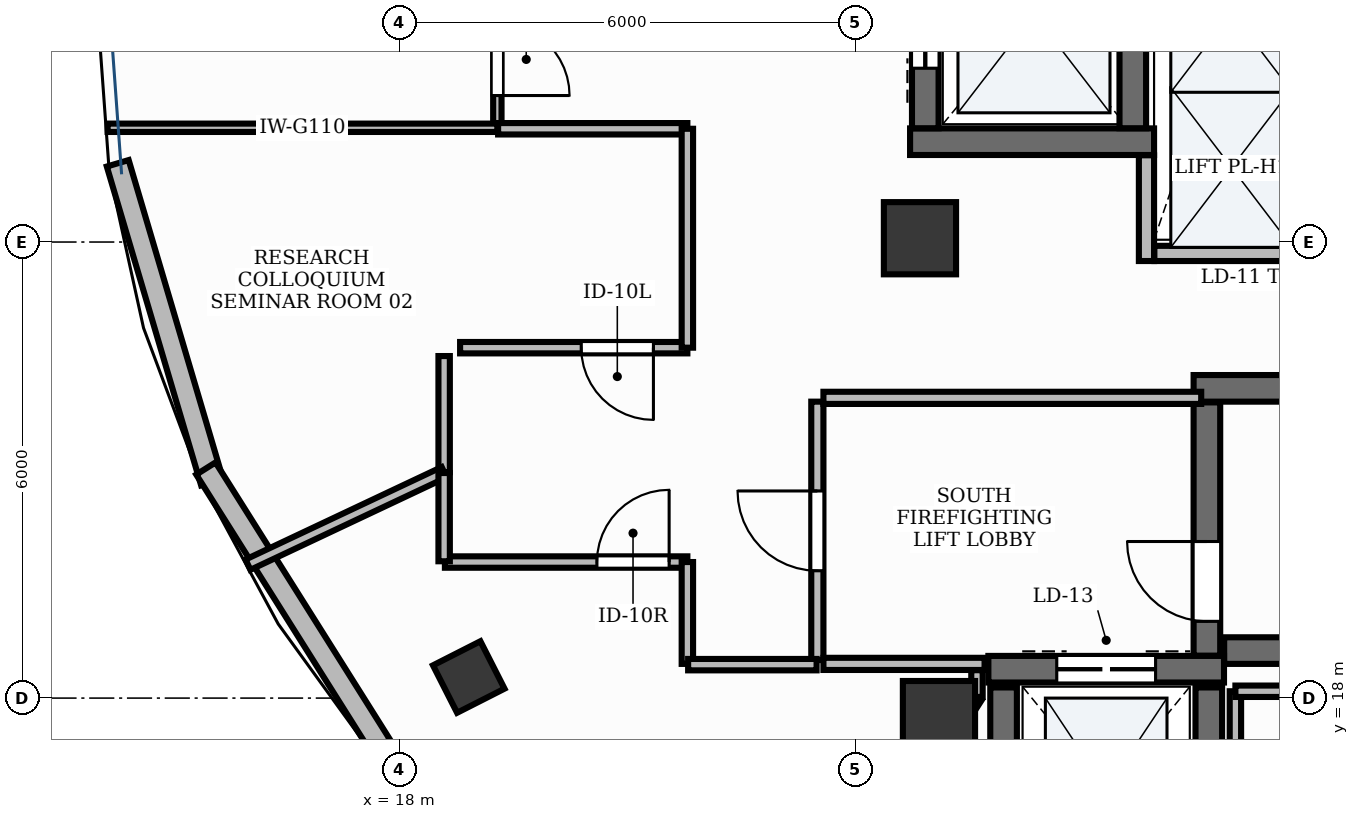
"""IFC4 building model, lengths in metres.
Left out: names, types, materials, properties, quantities, classifications, styles, units other than length and angle.
Written with IfcOpenShell. Run it as: python <this file> out.ifc"""

import sys

from ifc_helpers import new_model, si_unit, direction, frame, frame_2d, origin, origin_2d, place, context, subcontext, project, spatial, rectangle, extrude, element, fill, save


model = new_model("IFC4")
c1 = context("Model", 3, precision=1e-05, world=origin(), true_north=direction((0.0, 1.0)))
c2 = subcontext(c1, "Body", "Model", "MODEL_VIEW")
j1 = project(units=[si_unit("LENGTHUNIT", "METRE"), si_unit("PLANEANGLEUNIT", "RADIAN")], contexts=[c1])
p1 = place(None, origin())
s1 = spatial("IfcSite", under=j1, at=p1, CompositionType="ELEMENT")
p2 = place(p1, origin())
s2 = spatial("IfcBuilding", under=s1, at=p2, CompositionType="ELEMENT")
p3 = place(p2, frame((0.0, 0.0, 327.0)))
s3 = spatial("IfcBuildingStorey", under=s2, at=p3, CompositionType="ELEMENT", Elevation=327.0)
p4 = place(p3, frame((28.852, 18.625, 0.0), z_axis=(0.0, 0.0, 1.0), x_axis=(1.0, 0.0, 0.0)))
e1 = element("IfcWall", 1, at=p4, inside=s3, PredefinedType="SHEAR", context=c2, shape_type="SweptSolid", body=[
    extrude(rectangle(XDim=8.148, YDim=0.35, at=frame_2d((4.074, 0.0))), origin(), (0.0, 0.0, 1.0), 3.9),
])
p5 = place(p3, frame((28.45, 22.075, 0.0), z_axis=(0.0, 0.0, 1.0), x_axis=(1.0, 0.0, 0.0)))
e2 = element("IfcWall", 2, at=p5, inside=s3, PredefinedType="SHEAR", context=c2, shape_type="SweptSolid", body=[
    extrude(rectangle(XDim=8.55, YDim=0.35, at=frame_2d((4.275, 0.0))), origin(), (0.0, 0.0, 1.0), 3.9),
])
p6 = place(p3, frame((28.625, 18.557, 0.0), z_axis=(0.0, 0.0, 1.0), x_axis=(0.0, 1.0, 0.0)))
e3 = element("IfcWall", 3, at=p6, inside=s3, PredefinedType="SHEAR", context=c2, shape_type="SweptSolid", body=[
    extrude(rectangle(XDim=3.333, YDim=0.35, at=frame_2d((1.667, 0.0))), origin(), (0.0, 0.0, 1.0), 3.9),
])
p7 = place(p6, frame((0.453, 0.0, 0.0)))
e4 = element("IfcOpeningElement", 4, at=p7, cuts=e3, PredefinedType="OPENING", context=c2, shape_type="SweptSolid", body=[
    extrude(rectangle(XDim=1.05, YDim=2.15, at=frame_2d((0.525, 1.075))), frame((0.0, 0.19, 0.0), z_axis=(0.0, -1.0, 0.0), x_axis=(1.0, 0.0, 0.0)), (0.0, 0.0, 1.0), 0.38),
])
p8 = place(p3, frame((25.75, 18.38, 0.0), z_axis=(0.0, 0.0, 1.0), x_axis=(1.0, 0.0, 0.0)))
e5 = element("IfcWall", 5, at=p8, inside=s3, PredefinedType="SHEAR", context=c2, shape_type="SweptSolid", body=[
    extrude(rectangle(XDim=3.1, YDim=0.35, at=frame_2d((1.55, 0.0))), origin(), (0.0, 0.0, 1.0), 3.9),
])
p9 = place(p8, frame((0.9, 0.0, 0.0)))
e6 = element("IfcOpeningElement", 6, at=p9, cuts=e5, PredefinedType="OPENING", context=c2, shape_type="SweptSolid", body=[
    extrude(rectangle(XDim=1.3, YDim=2.2, at=frame_2d((0.65, 1.1))), frame((0.0, 0.19, 0.0), z_axis=(0.0, -1.0, 0.0), x_axis=(1.0, 0.0, 0.0)), (0.0, 0.0, 1.0), 0.38),
])
for number, where, z_axis, x_axis in (
    (7, (25.95, 15.44, 0.0), (0.0, 0.0, 1.0), (0.0, 1.0, 0.0)),
    (8, (28.65, 15.44, 0.0), (0.0, 0.0, 1.0), (0.0, 1.0, 0.0)),
):
    element("IfcWall", number, at=place(p3, frame(where, z_axis=z_axis, x_axis=x_axis)), inside=s3, PredefinedType="SHEAR", context=c2, shape_type="SweptSolid", body=[
        extrude(rectangle(XDim=2.7, YDim=0.35, at=frame_2d((1.35, 0.0))), origin(), (0.0, 0.0, 1.0), 3.9),
    ])
p10 = place(p3, frame((24.72, 25.32, 0.0), z_axis=(0.0, 0.0, 1.0), x_axis=(1.0, 0.0, 0.0)))
e9 = element("IfcWall", 9, at=p10, inside=s3, PredefinedType="SHEAR", context=c2, shape_type="SweptSolid", body=[
    extrude(rectangle(XDim=3.21, YDim=0.35, at=frame_2d((1.605, 0.0))), origin(), (0.0, 0.0, 1.0), 3.9),
])
p11 = place(p3, frame((24.92, 25.497, 0.0), z_axis=(0.0, 0.0, 1.0), x_axis=(0.0, 1.0, 0.0)))
e10 = element("IfcWall", 10, at=p11, inside=s3, PredefinedType="SHEAR", context=c2, shape_type="SweptSolid", body=[
    extrude(rectangle(XDim=3.006, YDim=0.35, at=frame_2d((1.503, 0.0))), origin(), (0.0, 0.0, 1.0), 3.9),
])
p12 = place(p11, frame((0.79, 0.0, 0.0)))
e11 = element("IfcOpeningElement", 11, at=p12, cuts=e10, PredefinedType="OPENING", context=c2, shape_type="SweptSolid", body=[
    extrude(rectangle(XDim=1.3, YDim=2.2, at=frame_2d((0.65, 1.1))), frame((0.0, 0.19, 0.0), z_axis=(0.0, -1.0, 0.0), x_axis=(1.0, 0.0, 0.0)), (0.0, 0.0, 1.0), 0.38),
])
p13 = place(p3, frame((27.65, 25.497, 0.0), z_axis=(0.0, 0.0, 1.0), x_axis=(0.0, 1.0, 0.0)))
e12 = element("IfcWall", 12, at=p13, inside=s3, PredefinedType="SHEAR", context=c2, shape_type="SweptSolid", body=[
    extrude(rectangle(XDim=3.006, YDim=0.35, at=frame_2d((1.503, 0.0))), origin(), (0.0, 0.0, 1.0), 3.9),
])
for number, where, z_axis, x_axis in (
    (13, (24.85, 24.05, -0.0), (0.0, 0.0, 1.0), (1.0, 0.0, 0.0)),
    (14, (25.1, 17.75, -0.0), (0.0, 0.0, 1.0), (1.0, 0.0, 0.0)),
):
    element("IfcColumn", number, at=place(p3, frame(where, z_axis=z_axis, x_axis=x_axis)), inside=s3, PredefinedType="PILASTER", context=c2, shape_type="SweptSolid", body=[
        extrude(rectangle(XDim=0.95, YDim=0.95, at=origin_2d()), origin(), (0.0, 0.0, 1.0), 3.901),
    ])
p14 = place(p3, frame((18.914, 18.277, -0.0), z_axis=(0.0, 0.0, 1.0), x_axis=(-0.453057191132, 0.891481453292, 0.0)))
e15 = element("IfcColumn", 15, at=p14, inside=s3, PredefinedType="COLUMN", context=c2, shape_type="SweptSolid", body=[
    extrude(rectangle(XDim=0.7, YDim=0.7, at=origin_2d()), origin(), (0.0, 0.0, 1.0), 3.901),
])
p15 = place(p3, frame((14.296, 25.036, 0.0), z_axis=(0.0, 0.0, 1.0), x_axis=(0.28362844186, -0.958934255811, 0.0)))
e16 = element("IfcWall", 16, at=p15, inside=s3, PredefinedType="STANDARD", context=c2, shape_type="SweptSolid", body=[
    extrude(rectangle(XDim=4.375, YDim=0.3, at=frame_2d((2.187, 0.0))), origin(), (0.0, 0.0, 1.0), 3.9),
])
p16 = place(p3, frame((15.456, 21.021, 0.0), z_axis=(0.0, 0.0, 1.0), x_axis=(0.532667112983, -0.846324847057, 0.0)))
e17 = element("IfcWall", 17, at=p16, inside=s3, PredefinedType="STANDARD", context=c2, shape_type="SweptSolid", body=[
    extrude(rectangle(XDim=4.519, YDim=0.3, at=frame_2d((2.26, 0.0))), origin(), (0.0, 0.0, 1.0), 3.9),
])
p17 = place(p3, frame((27.83, 23.75, 0.0), z_axis=(0.0, 0.0, 1.0), x_axis=(0.0, 1.0, 0.0)))
e18 = element("IfcWall", 18, at=p17, inside=s3, PredefinedType="PARTITIONING", context=c2, shape_type="SweptSolid", body=[
    extrude(rectangle(XDim=1.391, YDim=0.2, at=frame_2d((0.696, 0.0))), origin(), (0.0, 0.0, 1.0), 2.22),
])
p18 = place(p3, frame((27.934, 23.85, 0.0), z_axis=(0.0, 0.0, 1.0), x_axis=(1.0, 0.0, 0.0)))
e19 = element("IfcWall", 19, at=p18, inside=s3, PredefinedType="PARTITIONING", context=c2, shape_type="SweptSolid", body=[
    extrude(rectangle(XDim=2.096, YDim=0.2, at=frame_2d((1.048, 0.0))), origin(), (0.0, 0.0, 1.0), 2.22),
])
p19 = place(p3, frame((23.5, 18.5, 0.0), z_axis=(0.0, 0.0, 1.0), x_axis=(0.0, 1.0, 0.0)))
e20 = element("IfcWall", 20, at=p19, inside=s3, PredefinedType="PARTITIONING", context=c2, shape_type="SweptSolid", body=[
    extrude(rectangle(XDim=3.4, YDim=0.16, at=frame_2d((1.7, 0.0))), origin(), (0.0, 0.0, 1.0), 2.22),
])
p20 = place(p19, frame((1.175, 0.0, 0.0)))
e21 = element("IfcOpeningElement", 21, at=p20, cuts=e20, PredefinedType="OPENING", context=c2, shape_type="SweptSolid", body=[
    extrude(rectangle(XDim=1.05, YDim=2.15, at=frame_2d((0.525, 1.075))), frame((0.0, 0.095, 0.0), z_axis=(0.0, -1.0, 0.0), x_axis=(1.0, 0.0, 0.0)), (0.0, 0.0, 1.0), 0.19),
])
p21 = place(p3, frame((23.58, 21.95, 0.0), z_axis=(0.0, 0.0, 1.0), x_axis=(1.0, 0.0, 0.0)))
e22 = element("IfcWall", 22, at=p21, inside=s3, PredefinedType="PARTITIONING", context=c2, shape_type="SweptSolid", body=[
    extrude(rectangle(XDim=4.97, YDim=0.16, at=frame_2d((2.485, 0.0))), origin(), (0.0, 0.0, 1.0), 2.22),
])
p22 = place(p3, frame((23.58, 18.45, 0.0), z_axis=(0.0, 0.0, 1.0), x_axis=(1.0, 0.0, 0.0)))
e23 = element("IfcWall", 23, at=p22, inside=s3, PredefinedType="PARTITIONING", context=c2, shape_type="SweptSolid", body=[
    extrude(rectangle(XDim=2.12, YDim=0.16, at=frame_2d((1.06, 0.0))), origin(), (0.0, 0.0, 1.0), 2.22),
])
p23 = place(p3, frame((19.29, 27.6, 0.0), z_axis=(0.0, 0.0, 1.0), x_axis=(0.0, -1.0, 0.0)))
e24 = element("IfcWall", 24, at=p23, inside=s3, PredefinedType="MOVABLE", context=c2, shape_type="SweptSolid", body=[
    extrude(rectangle(XDim=2.097, YDim=0.11, at=frame_2d((1.049, 0.0))), origin(), (0.0, 0.0, 1.0), 2.22),
])
p24 = place(p23, frame((0.723, 0.0, 0.0)))
e25 = element("IfcOpeningElement", 25, at=p24, cuts=e24, PredefinedType="OPENING", context=c2, shape_type="SweptSolid", body=[
    extrude(rectangle(XDim=0.95, YDim=2.15, at=frame_2d((0.475, 1.075))), frame((0.0, 0.07, 0.0), z_axis=(0.0, -1.0, 0.0), x_axis=(1.0, 0.0, 0.0)), (0.0, 0.0, 1.0), 0.14),
])
p25 = place(p3, frame((21.79, 22.61, 0.0), z_axis=(0.0, 0.0, 1.0), x_axis=(-1.0, 0.0, 0.0)))
e26 = element("IfcWall", 26, at=p25, inside=s3, PredefinedType="PARTITIONING", context=c2, shape_type="SweptSolid", body=[
    extrude(rectangle(XDim=2.99, YDim=0.15, at=frame_2d((1.495, 0.0))), origin(), (0.0, 0.0, 1.0), 2.22),
])
p26 = place(p25, frame((0.447, 0.0, 0.0)))
e27 = element("IfcOpeningElement", 27, at=p26, cuts=e26, PredefinedType="OPENING", context=c2, shape_type="SweptSolid", body=[
    extrude(rectangle(XDim=0.95, YDim=2.15, at=frame_2d((0.475, 1.075))), frame((0.0, 0.09, 0.0), z_axis=(0.0, -1.0, 0.0), x_axis=(1.0, 0.0, 0.0)), (0.0, 0.0, 1.0), 0.18),
])
p27 = place(p3, frame((18.6, 19.79, 0.0), z_axis=(0.0, 0.0, 1.0), x_axis=(1.0, 0.0, 0.0)))
e28 = element("IfcWall", 28, at=p27, inside=s3, PredefinedType="PARTITIONING", context=c2, shape_type="SweptSolid", body=[
    extrude(rectangle(XDim=3.19, YDim=0.15, at=frame_2d((1.595, 0.0))), origin(), (0.0, 0.0, 1.0), 2.22),
])
p28 = place(p27, frame((2.0, 0.0, 0.0)))
e29 = element("IfcOpeningElement", 29, at=p28, cuts=e28, PredefinedType="OPENING", context=c2, shape_type="SweptSolid", body=[
    extrude(rectangle(XDim=0.95, YDim=2.15, at=frame_2d((0.475, 1.075))), frame((0.0, 0.09, 0.0), z_axis=(0.0, -1.0, 0.0), x_axis=(1.0, 0.0, 0.0)), (0.0, 0.0, 1.0), 0.18),
])
p29 = place(p3, frame((19.29, 25.503, 0.0), z_axis=(0.0, 0.0, 1.0), x_axis=(-1.0, 0.0, 0.0)))
e30 = element("IfcWall", 30, at=p29, inside=s3, PredefinedType="MOVABLE", context=c2, shape_type="SweptSolid", body=[
    extrude(rectangle(XDim=5.127, YDim=0.11, at=frame_2d((2.564, 0.0))), origin(), (0.0, 0.0, 1.0), 2.22),
])
p30 = place(p3, frame((19.3, 25.49, 0.0), z_axis=(0.0, 0.0, 1.0), x_axis=(1.0, 0.0, 0.0)))
e31 = element("IfcWall", 31, at=p30, inside=s3, PredefinedType="PARTITIONING", context=c2, shape_type="SweptSolid", body=[
    extrude(rectangle(XDim=2.49, YDim=0.15, at=frame_2d((1.245, 0.0))), origin(), (0.0, 0.0, 1.0), 2.22),
])
p31 = place(p3, frame((21.79, 25.49, 0.0), z_axis=(0.0, 0.0, 1.0), x_axis=(0.0, -1.0, 0.0)))
e32 = element("IfcWall", 32, at=p31, inside=s3, PredefinedType="PARTITIONING", context=c2, shape_type="SweptSolid", body=[
    extrude(rectangle(XDim=2.88, YDim=0.15, at=frame_2d((1.44, 0.0))), origin(), (0.0, 0.0, 1.0), 2.22),
])
p32 = place(p3, frame((18.59, 22.5, 0.0), z_axis=(0.0, 0.0, 1.0), x_axis=(0.0, -1.0, 0.0)))
e33 = element("IfcWall", 33, at=p32, inside=s3, PredefinedType="PARTITIONING", context=c2, shape_type="SweptSolid", body=[
    extrude(rectangle(XDim=1.528, YDim=0.15, at=frame_2d((0.764, 0.0))), origin(), (0.0, 0.0, 1.0), 2.22),
])
p33 = place(p3, frame((18.59, 20.972, 0.0), z_axis=(0.0, 0.0, 1.0), x_axis=(-0.904490755002, -0.426493228687, 0.0)))
e34 = element("IfcWall", 34, at=p33, inside=s3, PredefinedType="PARTITIONING", context=c2, shape_type="SweptSolid", body=[
    extrude(rectangle(XDim=2.854, YDim=0.15, at=frame_2d((1.427, 0.0))), origin(), (0.0, 0.0, 1.0), 2.22),
])
p34 = place(p3, frame((25.6, 18.367, 0.0), z_axis=(0.0, 0.0, 1.0), x_axis=(0.0, -1.0, 0.0)))
e35 = element("IfcWall", 35, at=p34, inside=s3, PredefinedType="PARTITIONING", context=c2, shape_type="SweptSolid", body=[
    extrude(rectangle(XDim=0.352, YDim=0.15, at=frame_2d((0.176, 0.0))), origin(), (0.0, 0.0, 1.0), 2.22),
])
p35 = place(p3, frame((25.6, 18.015, 0.0), z_axis=(0.0, 0.0, 1.0), x_axis=(-0.540901303045, -0.841086071912, 0.0)))
e36 = element("IfcWall", 36, at=p35, inside=s3, PredefinedType="PARTITIONING", context=c2, shape_type="SweptSolid", body=[
    extrude(rectangle(XDim=1.975, YDim=0.15, at=frame_2d((0.987, 0.0))), origin(), (0.0, 0.0, 1.0), 2.22),
])
p36 = place(p3, frame((29.0, 16.352, 0.0), z_axis=(0.0, 0.0, 1.0), x_axis=(0.0, 1.0, 0.0)))
e37 = element("IfcWall", 37, at=p36, inside=s3, PredefinedType="PARTITIONING", context=c2, shape_type="SweptSolid", body=[
    extrude(rectangle(XDim=1.738, YDim=0.15, at=frame_2d((0.869, 0.0))), origin(), (0.0, 0.0, 1.0), 2.22),
])
p37 = place(p3, frame((29.0, 18.09, 0.0), z_axis=(0.0, 0.0, 1.0), x_axis=(1.0, 0.0, 0.0)))
e38 = element("IfcWall", 38, at=p37, inside=s3, PredefinedType="PARTITIONING", context=c2, shape_type="SweptSolid", body=[
    extrude(rectangle(XDim=8.35, YDim=0.15, at=frame_2d((4.175, 0.0))), origin(), (0.0, 0.0, 1.0), 2.22),
])
p38 = place(p3, frame((18.59, 20.961, 0.0), z_axis=(0.0, 0.0, 1.0), x_axis=(0.0, -1.0, 0.0)))
e39 = element("IfcWall", 39, at=p38, inside=s3, PredefinedType="PARTITIONING", context=c2, shape_type="SweptSolid", body=[
    extrude(rectangle(XDim=1.161, YDim=0.15, at=frame_2d((0.581, 0.0))), origin(), (0.0, 0.0, 1.0), 2.22),
])
p39 = place(p3, frame((21.79, 19.79, 0.0), z_axis=(0.0, 0.0, 1.0), x_axis=(0.0, -1.0, 0.0)))
e40 = element("IfcWall", 40, at=p39, inside=s3, PredefinedType="PARTITIONING", context=c2, shape_type="SweptSolid", body=[
    extrude(rectangle(XDim=1.34, YDim=0.15, at=frame_2d((0.67, 0.0))), origin(), (0.0, 0.0, 1.0), 2.22),
])
p40 = place(p3, frame((21.8, 18.44, 0.0), z_axis=(0.0, 0.0, 1.0), x_axis=(1.0, 0.0, 0.0)))
e41 = element("IfcWall", 41, at=p40, inside=s3, PredefinedType="PARTITIONING", context=c2, shape_type="SweptSolid", body=[
    extrude(rectangle(XDim=1.69, YDim=0.15, at=frame_2d((0.845, 0.0))), origin(), (0.0, 0.0, 1.0), 2.22),
])
p41 = place(p7, origin())
e42 = element("IfcDoor", 42, at=p41, inside=s3, OperationType="SINGLE_SWING_RIGHT", PredefinedType="DOOR", context=c2, shape_type="SweptSolid", body=[
    extrude(rectangle(XDim=1.05, YDim=2.15, at=frame_2d((0.525, 1.075))), frame((0.0, 0.025, 0.0), z_axis=(0.0, -1.0, 0.0), x_axis=(1.0, 0.0, 0.0)), (0.0, 0.0, 1.0), 0.05),
])
fill(e4, e42)
p42 = place(p9, origin())
e43 = element("IfcDoor", 43, at=p42, inside=s3, OperationType="DOUBLE_DOOR_SLIDING", PredefinedType="DOOR", context=c2, shape_type="SweptSolid", body=[
    extrude(rectangle(XDim=1.3, YDim=2.2, at=frame_2d((0.65, 1.1))), frame((0.0, 0.025, 0.0), z_axis=(0.0, -1.0, 0.0), x_axis=(1.0, 0.0, 0.0)), (0.0, 0.0, 1.0), 0.05),
])
fill(e6, e43)
p43 = place(p12, origin())
e44 = element("IfcDoor", 44, at=p43, inside=s3, OperationType="DOUBLE_DOOR_SLIDING", PredefinedType="DOOR", context=c2, shape_type="SweptSolid", body=[
    extrude(rectangle(XDim=1.3, YDim=2.2, at=frame_2d((0.65, 1.1))), frame((0.0, 0.025, 0.0), z_axis=(0.0, -1.0, 0.0), x_axis=(1.0, 0.0, 0.0)), (0.0, 0.0, 1.0), 0.05),
])
fill(e11, e44)
p44 = place(p20, origin())
e45 = element("IfcDoor", 45, at=p44, inside=s3, OperationType="SINGLE_SWING_RIGHT", PredefinedType="DOOR", context=c2, shape_type="SweptSolid", body=[
    extrude(rectangle(XDim=1.05, YDim=2.15, at=frame_2d((0.525, 1.075))), frame((0.0, 0.025, 0.0), z_axis=(0.0, -1.0, 0.0), x_axis=(1.0, 0.0, 0.0)), (0.0, 0.0, 1.0), 0.05),
])
fill(e21, e45)
p45 = place(p24, origin())
e46 = element("IfcDoor", 46, at=p45, inside=s3, OperationType="SINGLE_SWING_RIGHT", PredefinedType="DOOR", context=c2, shape_type="SweptSolid", body=[
    extrude(rectangle(XDim=0.95, YDim=2.15, at=frame_2d((0.475, 1.075))), frame((0.0, 0.025, 0.0), z_axis=(0.0, -1.0, 0.0), x_axis=(1.0, 0.0, 0.0)), (0.0, 0.0, 1.0), 0.05),
])
fill(e25, e46)
p46 = place(p26, origin())
e47 = element("IfcDoor", 47, at=p46, inside=s3, OperationType="SINGLE_SWING_LEFT", PredefinedType="DOOR", context=c2, shape_type="SweptSolid", body=[
    extrude(rectangle(XDim=0.95, YDim=2.15, at=frame_2d((0.475, 1.075))), frame((0.0, 0.025, 0.0), z_axis=(0.0, -1.0, 0.0), x_axis=(1.0, 0.0, 0.0)), (0.0, 0.0, 1.0), 0.05),
])
fill(e27, e47)
p47 = place(p28, origin())
e48 = element("IfcDoor", 48, at=p47, inside=s3, OperationType="SINGLE_SWING_RIGHT", PredefinedType="DOOR", context=c2, shape_type="SweptSolid", body=[
    extrude(rectangle(XDim=0.95, YDim=2.15, at=frame_2d((0.475, 1.075))), frame((0.0, 0.025, 0.0), z_axis=(0.0, -1.0, 0.0), x_axis=(1.0, 0.0, 0.0)), (0.0, 0.0, 1.0), 0.05),
])
fill(e29, e48)
save(model, sys.argv[1])
